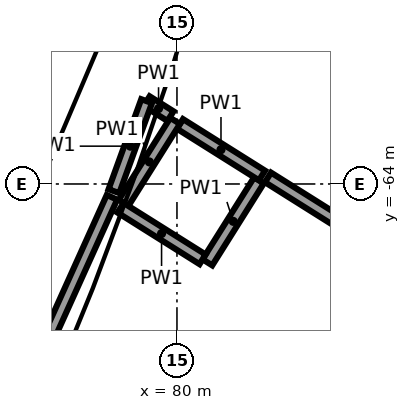
"""IFC4 building model, lengths in metres.
Left out: names, types, materials, properties, quantities, classifications, styles, units other than length and angle.
Written with IfcOpenShell. Run it as: python <this file> out.ifc"""

import sys

from ifc_helpers import new_model, si_unit, direction, frame, frame_2d, origin, origin_2d, place, context, subcontext, project, spatial, rectangle, circle, extrude, element, save


model = new_model("IFC4")
c1 = context("Model", 3, precision=1e-05, world=origin(), true_north=direction((0.0, 1.0)))
c2 = subcontext(c1, "Body", "Model", "MODEL_VIEW")
j1 = project(units=[si_unit("LENGTHUNIT", "METRE"), si_unit("PLANEANGLEUNIT", "RADIAN")], contexts=[c1])
p1 = place(None, origin())
s1 = spatial("IfcSite", under=j1, at=p1, CompositionType="ELEMENT")
p2 = place(p1, origin())
s2 = spatial("IfcBuilding", under=s1, at=p2, CompositionType="ELEMENT")
p3 = place(p2, frame((0.0, 0.0, 24.0)))
s3 = spatial("IfcBuildingStorey", under=s2, at=p3, CompositionType="ELEMENT", Elevation=24.0)
p4 = place(p3, frame((82.169, -63.034, 0.0), z_axis=(0.0, 0.0, 1.0), x_axis=(1.0, 0.0, 0.0)))
e1 = element("IfcColumn", 1, at=p4, inside=s3, PredefinedType="COLUMN", context=c2, shape_type="SweptSolid", body=[
    extrude(circle(Radius=0.5, at=origin_2d()), origin(), (0.0, 0.0, 1.0), 6.0),
])
for number, where, z_axis, x_axis in (
    (2, (80.401, -65.031, 0.0), (0.0, 0.0, 1.0), (0.532, 0.847, 0.0)),
    (3, (81.119, -63.888, 0.0), (0.0, 0.0, 1.0), (-0.847, 0.532, 0.0)),
):
    element("IfcWall", number, at=place(p3, frame(where, z_axis=z_axis, x_axis=x_axis)), inside=s3, PredefinedType="PARTITIONING", context=c2, shape_type="SweptSolid", body=[
        extrude(rectangle(XDim=1.275, YDim=0.15, at=frame_2d((0.638, 0.0))), origin(), (0.0, 0.0, 1.0), 5.4),
    ])
for number, where, z_axis, x_axis in (
    (4, (79.976, -63.17, 0.0), (0.0, 0.0, 1.0), (-0.532, -0.847, 0.0)),
    (5, (79.258, -64.313, 0.0), (0.0, 0.0, 1.0), (0.847, -0.532, 0.0)),
):
    element("IfcWall", number, at=place(p3, frame(where, z_axis=z_axis, x_axis=x_axis)), inside=s3, PredefinedType="PARTITIONING", context=c2, shape_type="SweptSolid", body=[
        extrude(rectangle(XDim=1.275, YDim=0.15, at=frame_2d((0.637, 0.0))), origin(), (0.0, 0.0, 1.0), 5.4),
    ])
p5 = place(p3, frame((85.011, -66.31, 0.0), z_axis=(0.0, 0.0, 1.0), x_axis=(-0.846716787841, 0.532043871489, 0.0)))
e6 = element("IfcWall", 6, at=p5, inside=s3, PredefinedType="PARTITIONING", context=c2, shape_type="SweptSolid", body=[
    extrude(rectangle(XDim=4.504, YDim=0.15, at=frame_2d((2.252, 0.0))), origin(), (0.0, 0.0, 1.0), 5.4),
])
p6 = place(p5, frame((0.65, 0.0, 0.0)))
e7 = element("IfcOpeningElement", 7, at=p6, cuts=e6, PredefinedType="OPENING", context=c2, shape_type="SweptSolid", body=[
    extrude(rectangle(XDim=1.8, YDim=2.1, at=frame_2d((0.9, 1.05))), frame((0.0, 0.085, 0.0), z_axis=(0.0, -1.0, 0.0), x_axis=(1.0, 0.0, 0.0)), (0.0, 0.0, 1.0), 0.17),
])
p7 = place(p3, frame((79.915, -63.107, 0.0), z_axis=(0.0, 0.0, 1.0), x_axis=(-0.846628080833, 0.5321850174, 0.0)))
e8 = element("IfcWall", 8, at=p7, inside=s3, PredefinedType="PARTITIONING", context=c2, shape_type="SweptSolid", body=[
    extrude(rectangle(XDim=0.371, YDim=0.15, at=frame_2d((0.186, 0.0))), origin(), (0.0, 0.0, 1.0), 5.4),
])
p8 = place(p3, frame((79.601, -62.91, 0.0), z_axis=(0.0, 0.0, 1.0), x_axis=(-0.341276475673, -0.939962960522, 0.0)))
e9 = element("IfcWall", 9, at=p8, inside=s3, PredefinedType="PARTITIONING", context=c2, shape_type="SweptSolid", body=[
    extrude(rectangle(XDim=1.26, YDim=0.15, at=frame_2d((0.63, 0.0))), origin(), (0.0, 0.0, 1.0), 5.4),
])
p9 = place(p3, frame((79.145, -64.175, 0.0), z_axis=(0.0, 0.0, 1.0), x_axis=(-0.411198704288, -0.911545734229, 0.0)))
e10 = element("IfcWall", 10, at=p9, inside=s3, PredefinedType="PARTITIONING", context=c2, shape_type="SweptSolid", body=[
    extrude(rectangle(XDim=7.435, YDim=0.15, at=frame_2d((3.718, 0.0))), origin(), (0.0, 0.0, 1.0), 5.4),
])
save(model, sys.argv[1])
